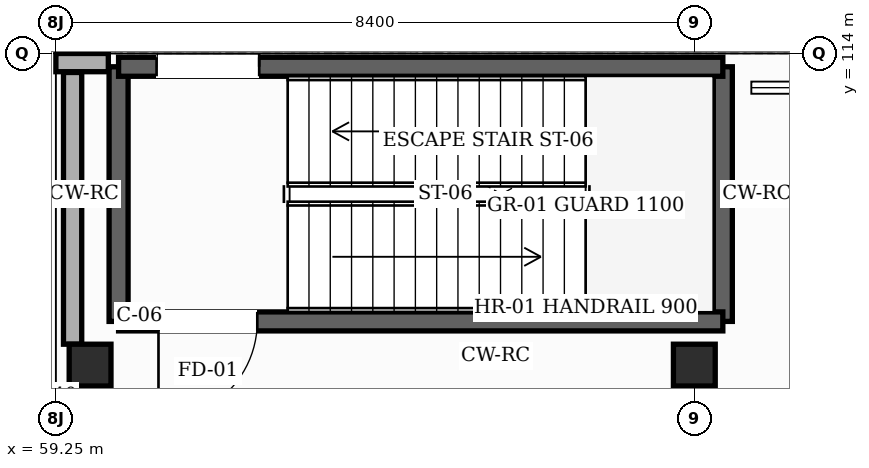
"""IFC4 building model, lengths in metres.
Left out: names, types, materials, properties, quantities, classifications, styles, units other than length and angle.
Written with IfcOpenShell. Run it as: python <this file> out.ifc"""

import sys

from ifc_helpers import new_model, si_unit, direction, frame, frame_2d, origin, origin_2d, place, context, subcontext, project, spatial, rectangle, hollow_rectangle, extrude, element, fill, save


model = new_model("IFC4")
c1 = context("Model", 3, precision=1e-05, world=origin(), true_north=direction((0.0, 1.0)))
c2 = subcontext(c1, "Body", "Model", "MODEL_VIEW")
j1 = project(units=[si_unit("LENGTHUNIT", "METRE"), si_unit("PLANEANGLEUNIT", "RADIAN")], contexts=[c1])
p1 = place(None, origin())
s1 = spatial("IfcSite", under=j1, at=p1, CompositionType="ELEMENT")
p2 = place(p1, origin())
s2 = spatial("IfcBuilding", under=s1, at=p2, CompositionType="ELEMENT")
p3 = place(p2, origin())
s3 = spatial("IfcBuildingStorey", under=s2, at=p3, CompositionType="ELEMENT", Elevation=0.0)
for number, where, z_axis, x_axis in (
    (1, (59.7, 109.9, 0.0), (0.0, 0.0, 1.0), (1.0, 0.0, 0.0)),
    (2, (67.65, 109.9, 0.0), (0.0, 0.0, 1.0), (1.0, 0.0, 0.0)),
):
    element("IfcColumn", number, at=place(p3, frame(where, z_axis=z_axis, x_axis=x_axis)), inside=s3, PredefinedType="COLUMN", context=c2, shape_type="SweptSolid", body=[
        extrude(hollow_rectangle(XDim=0.55, YDim=0.55, WallThickness=0.022, InnerFilletRadius=0.022, OuterFilletRadius=0.044, at=origin_2d()), origin(), (0.0, 0.0, 1.0), 5.4),
    ])
p4 = place(p3, frame((59.25, 113.88, 0.0), z_axis=(0.0, 0.0, 1.0), x_axis=(1.0, 0.0, 0.0)))
e3 = element("IfcWall", 3, at=p4, inside=s3, PredefinedType="SOLIDWALL", context=c2, shape_type="SweptSolid", body=[
    extrude(rectangle(XDim=0.69, YDim=0.24, at=frame_2d((0.345, 0.0))), origin(), (0.0, 0.0, 1.0), 5.135),
])
p5 = place(p3, frame((59.47, 105.725, 0.0), z_axis=(0.0, 0.0, 1.0), x_axis=(0.0, 1.0, 0.0)))
e4 = element("IfcWall", 4, at=p5, inside=s3, PredefinedType="SOLIDWALL", context=c2, shape_type="SweptSolid", body=[
    extrude(rectangle(XDim=3.9, YDim=0.24, at=frame_2d((1.95, 0.0))), origin(), (0.0, 0.0, 1.0), 4.475),
])
p6 = place(p3, frame((59.47, 110.175, 0.0), z_axis=(0.0, 0.0, 1.0), x_axis=(0.0, 1.0, 0.0)))
e5 = element("IfcWall", 5, at=p6, inside=s3, PredefinedType="SOLIDWALL", context=c2, shape_type="SweptSolid", body=[
    extrude(rectangle(XDim=3.575, YDim=0.24, at=frame_2d((1.788, 0.0))), origin(), (0.0, 0.0, 1.0), 5.135),
])
for number, where, z_axis, x_axis in (
    (6, (60.075, 110.475, 0.0), (0.0, 0.0, 1.0), (0.0, 1.0, 0.0)),
    (7, (68.025, 113.825, 0.0), (0.0, 0.0, 1.0), (0.0, -1.0, 0.0)),
):
    element("IfcWall", number, at=place(p3, frame(where, z_axis=z_axis, x_axis=x_axis)), inside=s3, PredefinedType="SHEAR", context=c2, shape_type="SweptSolid", body=[
        extrude(rectangle(XDim=3.35, YDim=0.25, at=frame_2d((1.675, 0.0))), origin(), (0.0, 0.0, 1.0), 5.15),
    ])
p7 = place(p3, frame((68.025, 110.475, 0.0), z_axis=(0.0, 0.0, 1.0), x_axis=(-1.0, 0.0, 0.0)))
e8 = element("IfcWall", 8, at=p7, inside=s3, PredefinedType="SHEAR", context=c2, shape_type="SweptSolid", body=[
    extrude(rectangle(XDim=7.95, YDim=0.25, at=frame_2d((3.975, 0.0))), origin(), (0.0, 0.0, 1.0), 5.15),
])
p8 = place(p7, frame((6.125, 0.0, 0.0)))
e9 = element("IfcOpeningElement", 9, at=p8, cuts=e8, PredefinedType="OPENING", context=c2, shape_type="SweptSolid", body=[
    extrude(rectangle(XDim=1.3, YDim=2.2, at=frame_2d((0.65, 1.1))), frame((0.0, 0.135, 0.0), z_axis=(0.0, -1.0, 0.0), x_axis=(1.0, 0.0, 0.0)), (0.0, 0.0, 1.0), 0.27),
])
p9 = place(p3, frame((60.075, 113.825, 0.0), z_axis=(0.0, 0.0, 1.0), x_axis=(1.0, 0.0, 0.0)))
e10 = element("IfcWall", 10, at=p9, inside=s3, PredefinedType="SHEAR", context=c2, shape_type="SweptSolid", body=[
    extrude(rectangle(XDim=7.95, YDim=0.25, at=frame_2d((3.975, 0.0))), origin(), (0.0, 0.0, 1.0), 5.15),
])
p10 = place(p9, frame((0.5, 0.0, 0.0)))
e11 = element("IfcOpeningElement", 11, at=p10, cuts=e10, PredefinedType="OPENING", context=c2, shape_type="SweptSolid", body=[
    extrude(rectangle(XDim=1.35, YDim=2.3, at=frame_2d((0.675, 1.15))), frame((0.0, 0.135, 0.0), z_axis=(0.0, -1.0, 0.0), x_axis=(1.0, 0.0, 0.0)), (0.0, 0.0, 1.0), 0.27),
])
p11 = place(p8, origin())
e12 = element("IfcDoor", 12, at=p11, inside=s3, OperationType="SINGLE_SWING_RIGHT", PredefinedType="DOOR", context=c2, shape_type="SweptSolid", body=[
    extrude(rectangle(XDim=1.3, YDim=2.2, at=frame_2d((0.65, 1.1))), frame((0.0, 0.025, 0.0), z_axis=(0.0, -1.0, 0.0), x_axis=(1.0, 0.0, 0.0)), (0.0, 0.0, 1.0), 0.05),
])
fill(e9, e12)
p12 = place(p10, origin())
e13 = element("IfcDoor", 13, at=p12, inside=s3, OperationType="SINGLE_SWING_RIGHT", PredefinedType="DOOR", context=c2, shape_type="SweptSolid", body=[
    extrude(rectangle(XDim=1.35, YDim=2.3, at=frame_2d((0.675, 1.15))), frame((0.0, 0.025, 0.0), z_axis=(0.0, -1.0, 0.0), x_axis=(1.0, 0.0, 0.0)), (0.0, 0.0, 1.0), 0.05),
])
fill(e11, e13)
save(model, sys.argv[1])
